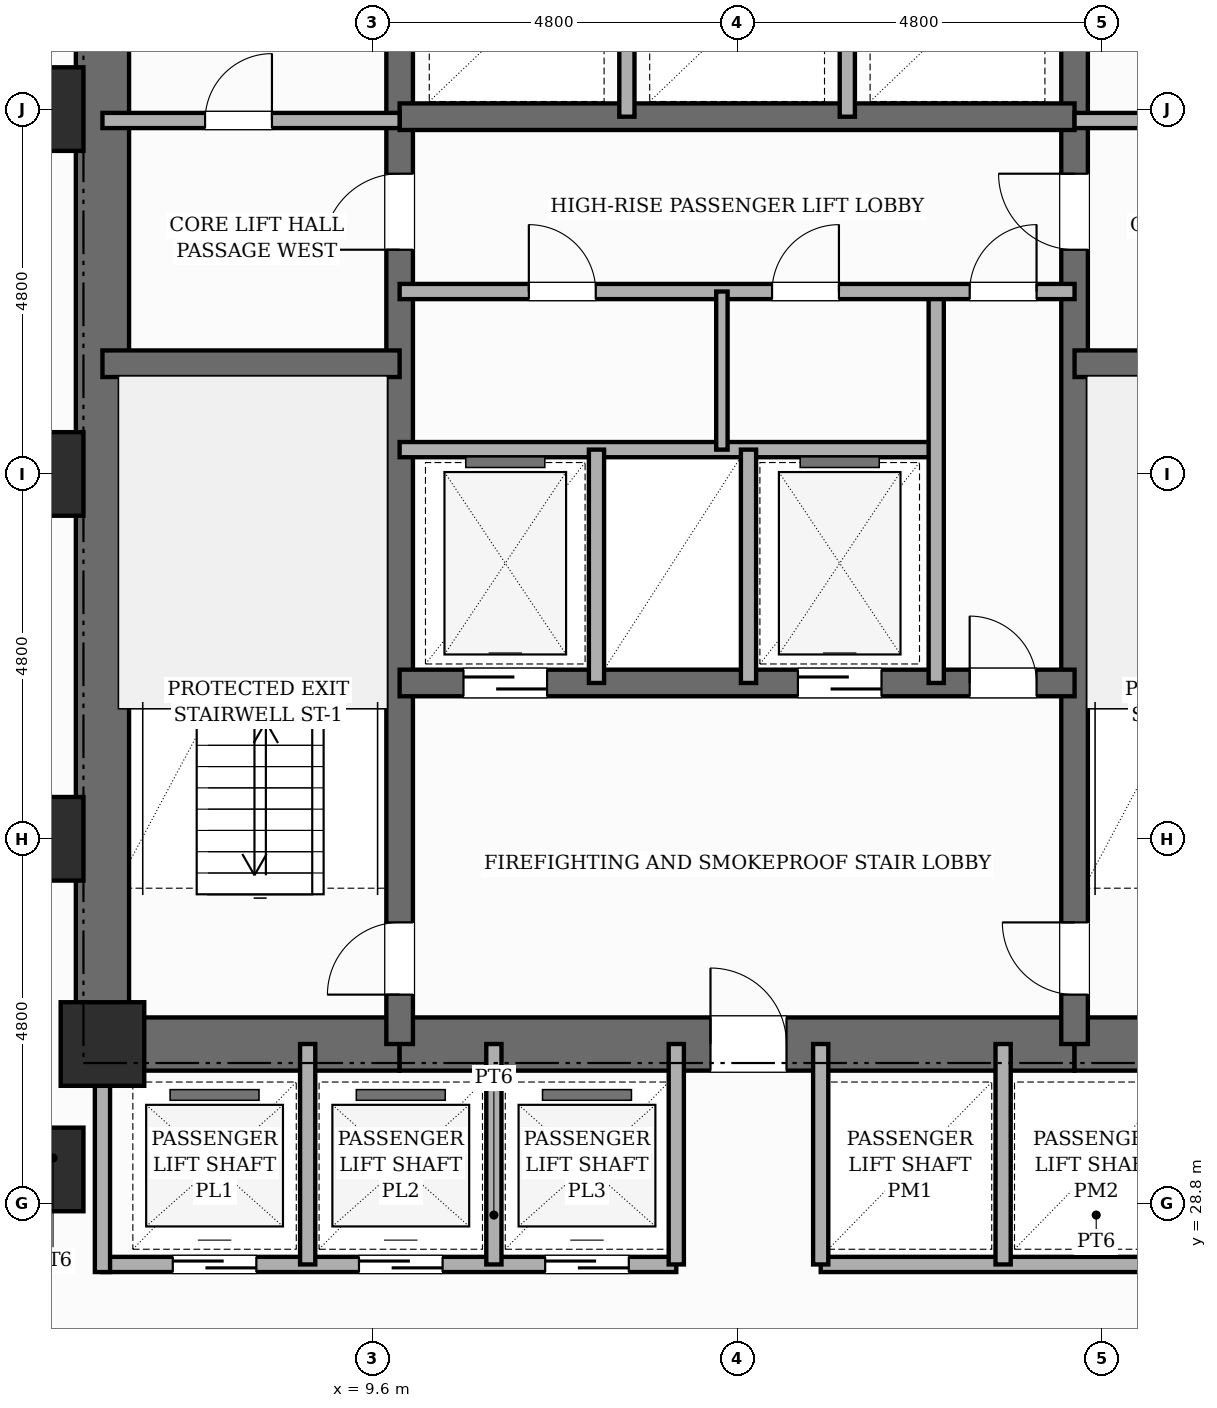
"""IFC4 building model, lengths in metres.
Left out: names, types, materials, properties, quantities, classifications, styles, units other than length and angle.
Written with IfcOpenShell. Run it as: python <this file> out.ifc"""

import sys

from ifc_helpers import new_model, si_unit, direction, frame, frame_2d, origin, origin_2d, place, context, subcontext, project, spatial, rectangle, extrude, element, fill, save


model = new_model("IFC4")
c1 = context("Model", 3, precision=1e-05, world=origin(), true_north=direction((0.0, 1.0)))
c2 = subcontext(c1, "Body", "Model", "MODEL_VIEW")
j1 = project(units=[si_unit("LENGTHUNIT", "METRE"), si_unit("PLANEANGLEUNIT", "RADIAN")], contexts=[c1])
p1 = place(None, origin())
s1 = spatial("IfcSite", under=j1, at=p1, CompositionType="ELEMENT")
p2 = place(p1, origin())
s2 = spatial("IfcBuilding", under=s1, at=p2, CompositionType="ELEMENT")
p3 = place(p2, frame((0.0, 0.0, 68.2)))
s3 = spatial("IfcBuildingStorey", under=s2, at=p3, CompositionType="ELEMENT", Elevation=68.2)
p4 = place(p3, frame((6.05, 30.55, 0.0), z_axis=(0.0, 0.0, 1.0), x_axis=(0.0, 1.0, 0.0)))
e1 = element("IfcWall", 1, at=p4, inside=s3, PredefinedType="SHEAR", context=c2, shape_type="SweptSolid", body=[
    extrude(rectangle(XDim=15.6, YDim=0.7, at=frame_2d((7.8, 0.0))), origin(), (0.0, 0.0, 1.0), 3.6),
])
p5 = place(p3, frame((6.05, 30.9, 0.0), z_axis=(0.0, 0.0, 1.0), x_axis=(1.0, 0.0, 0.0)))
e2 = element("IfcWall", 2, at=p5, inside=s3, PredefinedType="SHEAR", context=c2, shape_type="SweptSolid", body=[
    extrude(rectangle(XDim=3.91, YDim=0.7, at=frame_2d((1.955, 0.0))), origin(), (0.0, 0.0, 1.0), 3.6),
])
p6 = place(p3, frame((9.96, 30.9, 0.0), z_axis=(0.0, 0.0, 1.0), x_axis=(1.0, 0.0, 0.0)))
e3 = element("IfcWall", 3, at=p6, inside=s3, PredefinedType="SHEAR", context=c2, shape_type="SweptSolid", body=[
    extrude(rectangle(XDim=8.88, YDim=0.7, at=frame_2d((4.44, 0.0))), origin(), (0.0, 0.0, 1.0), 3.6),
])
p7 = place(p6, frame((4.09, 0.0, 0.0)))
e4 = element("IfcOpeningElement", 4, at=p7, cuts=e3, PredefinedType="OPENING", context=c2, shape_type="SweptSolid", body=[
    extrude(rectangle(XDim=1.0, YDim=2.15, at=frame_2d((0.5, 1.075))), frame((0.0, 0.36, 0.0), z_axis=(0.0, -1.0, 0.0), x_axis=(1.0, 0.0, 0.0)), (0.0, 0.0, 1.0), 0.72),
])
p8 = place(p3, frame((18.84, 30.9, 0.0), z_axis=(0.0, 0.0, 1.0), x_axis=(1.0, 0.0, 0.0)))
e5 = element("IfcWall", 5, at=p8, inside=s3, PredefinedType="SHEAR", context=c2, shape_type="SweptSolid", body=[
    extrude(rectangle(XDim=3.91, YDim=0.7, at=frame_2d((1.955, 0.0))), origin(), (0.0, 0.0, 1.0), 3.6),
])
p9 = place(p3, frame((9.96, 30.9, 0.0), z_axis=(0.0, 0.0, 1.0), x_axis=(0.0, 1.0, 0.0)))
e6 = element("IfcWall", 6, at=p9, inside=s3, PredefinedType="SHEAR", context=c2, shape_type="SweptSolid", body=[
    extrude(rectangle(XDim=14.9, YDim=0.35, at=frame_2d((7.45, 0.0))), origin(), (0.0, 0.0, 1.0), 3.6),
])
p10 = place(p9, frame((0.65, 0.0, 0.0)))
e7 = element("IfcOpeningElement", 7, at=p10, cuts=e6, PredefinedType="OPENING", context=c2, shape_type="SweptSolid", body=[
    extrude(rectangle(XDim=0.95, YDim=2.1, at=frame_2d((0.475, 1.05))), frame((0.0, 0.185, 0.0), z_axis=(0.0, -1.0, 0.0), x_axis=(1.0, 0.0, 0.0)), (0.0, 0.0, 1.0), 0.37),
])
p11 = place(p9, frame((10.45, 0.0, 0.0)))
e8 = element("IfcOpeningElement", 8, at=p11, cuts=e6, PredefinedType="OPENING", context=c2, shape_type="SweptSolid", body=[
    extrude(rectangle(XDim=1.0, YDim=2.15, at=frame_2d((0.5, 1.075))), frame((0.0, 0.185, 0.0), z_axis=(0.0, -1.0, 0.0), x_axis=(1.0, 0.0, 0.0)), (0.0, 0.0, 1.0), 0.37),
])
p12 = place(p3, frame((18.84, 30.9, 0.0), z_axis=(0.0, 0.0, 1.0), x_axis=(0.0, 1.0, 0.0)))
e9 = element("IfcWall", 9, at=p12, inside=s3, PredefinedType="SHEAR", context=c2, shape_type="SweptSolid", body=[
    extrude(rectangle(XDim=14.9, YDim=0.35, at=frame_2d((7.45, 0.0))), origin(), (0.0, 0.0, 1.0), 3.6),
])
p13 = place(p12, frame((0.65, 0.0, 0.0)))
e10 = element("IfcOpeningElement", 10, at=p13, cuts=e9, PredefinedType="OPENING", context=c2, shape_type="SweptSolid", body=[
    extrude(rectangle(XDim=0.95, YDim=2.1, at=frame_2d((0.475, 1.05))), frame((0.0, 0.185, 0.0), z_axis=(0.0, -1.0, 0.0), x_axis=(1.0, 0.0, 0.0)), (0.0, 0.0, 1.0), 0.37),
])
p14 = place(p12, frame((10.45, 0.0, 0.0)))
e11 = element("IfcOpeningElement", 11, at=p14, cuts=e9, PredefinedType="OPENING", context=c2, shape_type="SweptSolid", body=[
    extrude(rectangle(XDim=1.0, YDim=2.15, at=frame_2d((0.5, 1.075))), frame((0.0, 0.185, 0.0), z_axis=(0.0, -1.0, 0.0), x_axis=(1.0, 0.0, 0.0)), (0.0, 0.0, 1.0), 0.37),
])
for number, where, z_axis, x_axis in (
    (12, (6.05, 39.85, 0.0), (0.0, 0.0, 1.0), (1.0, 0.0, 0.0)),
    (13, (18.84, 39.85, 0.0), (0.0, 0.0, 1.0), (1.0, 0.0, 0.0)),
):
    element("IfcWall", number, at=place(p3, frame(where, z_axis=z_axis, x_axis=x_axis)), inside=s3, PredefinedType="SHEAR", context=c2, shape_type="SweptSolid", body=[
        extrude(rectangle(XDim=3.91, YDim=0.35, at=frame_2d((1.955, 0.0))), origin(), (0.0, 0.0, 1.0), 3.6),
    ])
p15 = place(p3, frame((9.96, 35.65, 0.0), z_axis=(0.0, 0.0, 1.0), x_axis=(1.0, 0.0, 0.0)))
e14 = element("IfcWall", 14, at=p15, inside=s3, PredefinedType="SHEAR", context=c2, shape_type="SweptSolid", body=[
    extrude(rectangle(XDim=8.88, YDim=0.35, at=frame_2d((4.44, 0.0))), origin(), (0.0, 0.0, 1.0), 3.6),
])
p16 = place(p15, frame((0.84, 0.0, 0.0)))
e15 = element("IfcOpeningElement", 15, at=p16, cuts=e14, PredefinedType="OPENING", context=c2, shape_type="SweptSolid", body=[
    extrude(rectangle(XDim=1.1, YDim=2.15, at=frame_2d((0.55, 1.075))), frame((0.0, 0.185, 0.0), z_axis=(0.0, -1.0, 0.0), x_axis=(1.0, 0.0, 0.0)), (0.0, 0.0, 1.0), 0.37),
])
p17 = place(p15, frame((5.24, 0.0, 0.0)))
e16 = element("IfcOpeningElement", 16, at=p17, cuts=e14, PredefinedType="OPENING", context=c2, shape_type="SweptSolid", body=[
    extrude(rectangle(XDim=1.1, YDim=2.15, at=frame_2d((0.55, 1.075))), frame((0.0, 0.185, 0.0), z_axis=(0.0, -1.0, 0.0), x_axis=(1.0, 0.0, 0.0)), (0.0, 0.0, 1.0), 0.37),
])
p18 = place(p15, frame((7.5, 0.0, 0.0)))
e17 = element("IfcOpeningElement", 17, at=p18, cuts=e14, PredefinedType="OPENING", context=c2, shape_type="SweptSolid", body=[
    extrude(rectangle(XDim=0.88, YDim=2.1, at=frame_2d((0.44, 1.05))), frame((0.0, 0.185, 0.0), z_axis=(0.0, -1.0, 0.0), x_axis=(1.0, 0.0, 0.0)), (0.0, 0.0, 1.0), 0.37),
])
p19 = place(p3, frame((9.96, 43.1, 0.0), z_axis=(0.0, 0.0, 1.0), x_axis=(1.0, 0.0, 0.0)))
e18 = element("IfcWall", 18, at=p19, inside=s3, PredefinedType="SHEAR", context=c2, shape_type="SweptSolid", body=[
    extrude(rectangle(XDim=8.88, YDim=0.35, at=frame_2d((4.44, 0.0))), origin(), (0.0, 0.0, 1.0), 3.6),
])
for number, where, z_axis, x_axis in (
    (19, (5.25, 29.25, 0.0), (0.0, 0.0, 1.0), (1.0, 0.0, 0.0)),
    (20, (5.25, 33.6, 0.0), (0.0, 0.0, 1.0), (1.0, 0.0, 0.0)),
    (21, (5.25, 38.4, 0.0), (0.0, 0.0, 1.0), (1.0, 0.0, 0.0)),
    (22, (5.25, 43.2, 0.0), (0.0, 0.0, 1.0), (1.0, 0.0, 0.0)),
    (23, (6.05, 30.9, 0.0), (0.0, 0.0, 1.0), (1.0, 0.0, 0.0)),
):
    element("IfcColumn", number, at=place(p3, frame(where, z_axis=z_axis, x_axis=x_axis)), inside=s3, PredefinedType="COLUMN", context=c2, shape_type="SweptSolid", body=[
        extrude(rectangle(XDim=1.1, YDim=1.1, at=origin_2d()), origin(), (0.0, 0.0, 1.0), 3.6),
    ])
p20 = place(p3, frame((9.96, 38.72, 0.0), z_axis=(0.0, 0.0, 1.0), x_axis=(1.0, 0.0, 0.0)))
e24 = element("IfcWall", 24, at=p20, inside=s3, PredefinedType="POLYGONAL", context=c2, shape_type="SweptSolid", body=[
    extrude(rectangle(XDim=7.06, YDim=0.2, at=frame_2d((3.53, 0.0))), origin(), (0.0, 0.0, 1.0), 3.35),
])
for number, where, z_axis, x_axis in (
    (25, (12.55, 35.65, 0.0), (0.0, 0.0, 1.0), (0.0, 1.0, 0.0)),
    (26, (14.55, 35.65, 0.0), (0.0, 0.0, 1.0), (0.0, 1.0, 0.0)),
):
    element("IfcWall", number, at=place(p3, frame(where, z_axis=z_axis, x_axis=x_axis)), inside=s3, PredefinedType="POLYGONAL", context=c2, shape_type="SweptSolid", body=[
        extrude(rectangle(XDim=3.07, YDim=0.2, at=frame_2d((1.535, 0.0))), origin(), (0.0, 0.0, 1.0), 3.35),
    ])
p21 = place(p3, frame((17.02, 35.65, 0.0), z_axis=(0.0, 0.0, 1.0), x_axis=(0.0, 1.0, 0.0)))
e27 = element("IfcWall", 27, at=p21, inside=s3, PredefinedType="POLYGONAL", context=c2, shape_type="SweptSolid", body=[
    extrude(rectangle(XDim=5.15, YDim=0.2, at=frame_2d((2.575, 0.0))), origin(), (0.0, 0.0, 1.0), 3.35),
])
p22 = place(p3, frame((9.96, 40.8, 0.0), z_axis=(0.0, 0.0, 1.0), x_axis=(1.0, 0.0, 0.0)))
e28 = element("IfcWall", 28, at=p22, inside=s3, PredefinedType="POLYGONAL", context=c2, shape_type="SweptSolid", body=[
    extrude(rectangle(XDim=8.88, YDim=0.2, at=frame_2d((4.44, 0.0))), origin(), (0.0, 0.0, 1.0), 3.35),
])
p23 = place(p22, frame((7.5, 0.0, 0.0)))
e29 = element("IfcOpeningElement", 29, at=p23, cuts=e28, PredefinedType="OPENING", context=c2, shape_type="SweptSolid", body=[
    extrude(rectangle(XDim=0.88, YDim=2.1, at=frame_2d((0.44, 1.05))), frame((0.0, 0.11, 0.0), z_axis=(0.0, -1.0, 0.0), x_axis=(1.0, 0.0, 0.0)), (0.0, 0.0, 1.0), 0.22),
])
p24 = place(p22, frame((1.7, 0.0, 0.0)))
e30 = element("IfcOpeningElement", 30, at=p24, cuts=e28, PredefinedType="OPENING", context=c2, shape_type="SweptSolid", body=[
    extrude(rectangle(XDim=0.88, YDim=2.1, at=frame_2d((0.44, 1.05))), frame((0.0, 0.11, 0.0), z_axis=(0.0, -1.0, 0.0), x_axis=(1.0, 0.0, 0.0)), (0.0, 0.0, 1.0), 0.22),
])
p25 = place(p22, frame((4.9, 0.0, 0.0)))
e31 = element("IfcOpeningElement", 31, at=p25, cuts=e28, PredefinedType="OPENING", context=c2, shape_type="SweptSolid", body=[
    extrude(rectangle(XDim=0.88, YDim=2.1, at=frame_2d((0.44, 1.05))), frame((0.0, 0.11, 0.0), z_axis=(0.0, -1.0, 0.0), x_axis=(1.0, 0.0, 0.0)), (0.0, 0.0, 1.0), 0.22),
])
p26 = place(p3, frame((18.84, 43.05, 0.0), z_axis=(0.0, 0.0, 1.0), x_axis=(1.0, 0.0, 0.0)))
e32 = element("IfcWall", 32, at=p26, inside=s3, PredefinedType="POLYGONAL", context=c2, shape_type="SweptSolid", body=[
    extrude(rectangle(XDim=3.91, YDim=0.2, at=frame_2d((1.955, 0.0))), origin(), (0.0, 0.0, 1.0), 2.53),
])
p27 = place(p26, frame((1.35, 0.0, 0.0)))
e33 = element("IfcOpeningElement", 33, at=p27, cuts=e32, PredefinedType="OPENING", context=c2, shape_type="SweptSolid", body=[
    extrude(rectangle(XDim=0.88, YDim=2.1, at=frame_2d((0.44, 1.05))), frame((0.0, 0.11, 0.0), z_axis=(0.0, -1.0, 0.0), x_axis=(1.0, 0.0, 0.0)), (0.0, 0.0, 1.0), 0.22),
])
p28 = place(p3, frame((6.05, 43.05, 0.0), z_axis=(0.0, 0.0, 1.0), x_axis=(1.0, 0.0, 0.0)))
e34 = element("IfcWall", 34, at=p28, inside=s3, PredefinedType="POLYGONAL", context=c2, shape_type="SweptSolid", body=[
    extrude(rectangle(XDim=3.91, YDim=0.2, at=frame_2d((1.955, 0.0))), origin(), (0.0, 0.0, 1.0), 2.53),
])
p29 = place(p28, frame((1.35, 0.0, 0.0)))
e35 = element("IfcOpeningElement", 35, at=p29, cuts=e34, PredefinedType="OPENING", context=c2, shape_type="SweptSolid", body=[
    extrude(rectangle(XDim=0.88, YDim=2.1, at=frame_2d((0.44, 1.05))), frame((0.0, 0.11, 0.0), z_axis=(0.0, -1.0, 0.0), x_axis=(1.0, 0.0, 0.0)), (0.0, 0.0, 1.0), 0.22),
])
for number, where, z_axis, x_axis in (
    (36, (12.95, 43.1, 0.0), (0.0, 0.0, 1.0), (0.0, 1.0, 0.0)),
    (37, (15.85, 43.1, 0.0), (0.0, 0.0, 1.0), (0.0, 1.0, 0.0)),
):
    element("IfcWall", number, at=place(p3, frame(where, z_axis=z_axis, x_axis=x_axis)), inside=s3, PredefinedType="POLYGONAL", context=c2, shape_type="SweptSolid", body=[
        extrude(rectangle(XDim=2.55, YDim=0.2, at=frame_2d((1.275, 0.0))), origin(), (0.0, 0.0, 1.0), 3.35),
    ])
p30 = place(p3, frame((14.2, 38.72, 0.0), z_axis=(0.0, 0.0, 1.0), x_axis=(0.0, 1.0, 0.0)))
e38 = element("IfcWall", 38, at=p30, inside=s3, PredefinedType="PARTITIONING", context=c2, shape_type="SweptSolid", body=[
    extrude(rectangle(XDim=2.08, YDim=0.15, at=frame_2d((1.04, 0.0))), origin(), (0.0, 0.0, 1.0), 3.35),
])
p31 = place(p3, frame((6.05, 28.0, 0.0), z_axis=(0.0, 0.0, 1.0), x_axis=(1.0, 0.0, 0.0)))
e39 = element("IfcWall", 39, at=p31, inside=s3, PredefinedType="POLYGONAL", context=c2, shape_type="SweptSolid", body=[
    extrude(rectangle(XDim=7.55, YDim=0.2, at=frame_2d((3.775, 0.0))), origin(), (0.0, 0.0, 1.0), 3.35),
])
p32 = place(p31, frame((0.925, 0.0, 0.0)))
e40 = element("IfcOpeningElement", 40, at=p32, cuts=e39, PredefinedType="OPENING", context=c2, shape_type="SweptSolid", body=[
    extrude(rectangle(XDim=1.1, YDim=2.15, at=frame_2d((0.55, 1.075))), frame((0.0, 0.11, 0.0), z_axis=(0.0, -1.0, 0.0), x_axis=(1.0, 0.0, 0.0)), (0.0, 0.0, 1.0), 0.22),
])
p33 = place(p31, frame((3.375, 0.0, 0.0)))
e41 = element("IfcOpeningElement", 41, at=p33, cuts=e39, PredefinedType="OPENING", context=c2, shape_type="SweptSolid", body=[
    extrude(rectangle(XDim=1.1, YDim=2.15, at=frame_2d((0.55, 1.075))), frame((0.0, 0.11, 0.0), z_axis=(0.0, -1.0, 0.0), x_axis=(1.0, 0.0, 0.0)), (0.0, 0.0, 1.0), 0.22),
])
p34 = place(p31, frame((5.825, 0.0, 0.0)))
e42 = element("IfcOpeningElement", 42, at=p34, cuts=e39, PredefinedType="OPENING", context=c2, shape_type="SweptSolid", body=[
    extrude(rectangle(XDim=1.1, YDim=2.15, at=frame_2d((0.55, 1.075))), frame((0.0, 0.11, 0.0), z_axis=(0.0, -1.0, 0.0), x_axis=(1.0, 0.0, 0.0)), (0.0, 0.0, 1.0), 0.22),
])
p35 = place(p3, frame((15.5, 28.0, 0.0), z_axis=(0.0, 0.0, 1.0), x_axis=(1.0, 0.0, 0.0)))
e43 = element("IfcWall", 43, at=p35, inside=s3, PredefinedType="POLYGONAL", context=c2, shape_type="SweptSolid", body=[
    extrude(rectangle(XDim=7.25, YDim=0.2, at=frame_2d((3.625, 0.0))), origin(), (0.0, 0.0, 1.0), 3.35),
])
p36 = place(p3, frame((6.05, 27.9, 0.0), z_axis=(0.0, 0.0, 1.0), x_axis=(0.0, 1.0, 0.0)))
e44 = element("IfcWall", 44, at=p36, inside=s3, PredefinedType="POLYGONAL", context=c2, shape_type="SweptSolid", body=[
    extrude(rectangle(XDim=3.0, YDim=0.2, at=frame_2d((1.5, 0.0))), origin(), (0.0, 0.0, 1.0), 3.35),
])
for number, where, z_axis, x_axis in (
    (45, (13.6, 28.0, 0.0), (0.0, 0.0, 1.0), (0.0, 1.0, 0.0)),
    (46, (15.5, 28.0, 0.0), (0.0, 0.0, 1.0), (0.0, 1.0, 0.0)),
    (47, (8.75, 28.0, 0.0), (0.0, 0.0, 1.0), (0.0, 1.0, 0.0)),
    (48, (11.2, 28.0, 0.0), (0.0, 0.0, 1.0), (0.0, 1.0, 0.0)),
    (49, (17.9, 28.0, 0.0), (0.0, 0.0, 1.0), (0.0, 1.0, 0.0)),
):
    element("IfcWall", number, at=place(p3, frame(where, z_axis=z_axis, x_axis=x_axis)), inside=s3, PredefinedType="POLYGONAL", context=c2, shape_type="SweptSolid", body=[
        extrude(rectangle(XDim=2.9, YDim=0.2, at=frame_2d((1.45, 0.0))), origin(), (0.0, 0.0, 1.0), 3.35),
    ])
p37 = place(p10, origin())
e50 = element("IfcDoor", 50, at=p37, inside=s3, OperationType="SINGLE_SWING_LEFT", PredefinedType="DOOR", context=c2, shape_type="SweptSolid", body=[
    extrude(rectangle(XDim=0.95, YDim=2.1, at=frame_2d((0.475, 1.05))), frame((0.0, 0.025, 0.0), z_axis=(0.0, -1.0, 0.0), x_axis=(1.0, 0.0, 0.0)), (0.0, 0.0, 1.0), 0.05),
])
fill(e7, e50)
p38 = place(p13, origin())
e51 = element("IfcDoor", 51, at=p38, inside=s3, OperationType="SINGLE_SWING_RIGHT", PredefinedType="DOOR", context=c2, shape_type="SweptSolid", body=[
    extrude(rectangle(XDim=0.95, YDim=2.1, at=frame_2d((0.475, 1.05))), frame((0.0, 0.025, 0.0), z_axis=(0.0, -1.0, 0.0), x_axis=(1.0, 0.0, 0.0)), (0.0, 0.0, 1.0), 0.05),
])
fill(e10, e51)
p39 = place(p7, origin())
e52 = element("IfcDoor", 52, at=p39, inside=s3, OperationType="SINGLE_SWING_LEFT", PredefinedType="DOOR", context=c2, shape_type="SweptSolid", body=[
    extrude(rectangle(XDim=1.0, YDim=2.15, at=frame_2d((0.5, 1.075))), frame((0.0, 0.025, 0.0), z_axis=(0.0, -1.0, 0.0), x_axis=(1.0, 0.0, 0.0)), (0.0, 0.0, 1.0), 0.05),
])
fill(e4, e52)
p40 = place(p16, origin())
e53 = element("IfcDoor", 53, at=p40, inside=s3, OperationType="SLIDING_TO_LEFT", PredefinedType="DOOR", context=c2, shape_type="SweptSolid", body=[
    extrude(rectangle(XDim=1.1, YDim=2.15, at=frame_2d((0.55, 1.075))), frame((0.0, 0.025, 0.0), z_axis=(0.0, -1.0, 0.0), x_axis=(1.0, 0.0, 0.0)), (0.0, 0.0, 1.0), 0.05),
])
fill(e15, e53)
p41 = place(p17, origin())
e54 = element("IfcDoor", 54, at=p41, inside=s3, OperationType="SLIDING_TO_RIGHT", PredefinedType="DOOR", context=c2, shape_type="SweptSolid", body=[
    extrude(rectangle(XDim=1.1, YDim=2.15, at=frame_2d((0.55, 1.075))), frame((0.0, 0.025, 0.0), z_axis=(0.0, -1.0, 0.0), x_axis=(1.0, 0.0, 0.0)), (0.0, 0.0, 1.0), 0.05),
])
fill(e16, e54)
p42 = place(p18, origin())
e55 = element("IfcDoor", 55, at=p42, inside=s3, OperationType="SINGLE_SWING_LEFT", PredefinedType="DOOR", context=c2, shape_type="SweptSolid", body=[
    extrude(rectangle(XDim=0.88, YDim=2.1, at=frame_2d((0.44, 1.05))), frame((0.0, 0.025, 0.0), z_axis=(0.0, -1.0, 0.0), x_axis=(1.0, 0.0, 0.0)), (0.0, 0.0, 1.0), 0.05),
])
fill(e17, e55)
p43 = place(p23, origin())
e56 = element("IfcDoor", 56, at=p43, inside=s3, OperationType="SINGLE_SWING_RIGHT", PredefinedType="DOOR", context=c2, shape_type="SweptSolid", body=[
    extrude(rectangle(XDim=0.88, YDim=2.1, at=frame_2d((0.44, 1.05))), frame((0.0, 0.025, 0.0), z_axis=(0.0, -1.0, 0.0), x_axis=(1.0, 0.0, 0.0)), (0.0, 0.0, 1.0), 0.05),
])
fill(e29, e56)
p44 = place(p11, origin())
e57 = element("IfcDoor", 57, at=p44, inside=s3, OperationType="SINGLE_SWING_LEFT", PredefinedType="DOOR", context=c2, shape_type="SweptSolid", body=[
    extrude(rectangle(XDim=1.0, YDim=2.15, at=frame_2d((0.5, 1.075))), frame((0.0, 0.025, 0.0), z_axis=(0.0, -1.0, 0.0), x_axis=(1.0, 0.0, 0.0)), (0.0, 0.0, 1.0), 0.05),
])
fill(e8, e57)
p45 = place(p14, origin())
e58 = element("IfcDoor", 58, at=p45, inside=s3, OperationType="SINGLE_SWING_RIGHT", PredefinedType="DOOR", context=c2, shape_type="SweptSolid", body=[
    extrude(rectangle(XDim=1.0, YDim=2.15, at=frame_2d((0.5, 1.075))), frame((0.0, 0.025, 0.0), z_axis=(0.0, -1.0, 0.0), x_axis=(1.0, 0.0, 0.0)), (0.0, 0.0, 1.0), 0.05),
])
fill(e11, e58)
p46 = place(p29, origin())
e59 = element("IfcDoor", 59, at=p46, inside=s3, OperationType="SINGLE_SWING_RIGHT", PredefinedType="DOOR", context=c2, shape_type="SweptSolid", body=[
    extrude(rectangle(XDim=0.88, YDim=2.1, at=frame_2d((0.44, 1.05))), frame((0.0, 0.025, 0.0), z_axis=(0.0, -1.0, 0.0), x_axis=(1.0, 0.0, 0.0)), (0.0, 0.0, 1.0), 0.05),
])
fill(e35, e59)
p47 = place(p24, origin())
e60 = element("IfcDoor", 60, at=p47, inside=s3, OperationType="SINGLE_SWING_LEFT", PredefinedType="DOOR", context=c2, shape_type="SweptSolid", body=[
    extrude(rectangle(XDim=0.88, YDim=2.1, at=frame_2d((0.44, 1.05))), frame((0.0, 0.025, 0.0), z_axis=(0.0, -1.0, 0.0), x_axis=(1.0, 0.0, 0.0)), (0.0, 0.0, 1.0), 0.05),
])
fill(e30, e60)
p48 = place(p25, origin())
e61 = element("IfcDoor", 61, at=p48, inside=s3, OperationType="SINGLE_SWING_RIGHT", PredefinedType="DOOR", context=c2, shape_type="SweptSolid", body=[
    extrude(rectangle(XDim=0.88, YDim=2.1, at=frame_2d((0.44, 1.05))), frame((0.0, 0.025, 0.0), z_axis=(0.0, -1.0, 0.0), x_axis=(1.0, 0.0, 0.0)), (0.0, 0.0, 1.0), 0.05),
])
fill(e31, e61)
p49 = place(p32, origin())
e62 = element("IfcDoor", 62, at=p49, inside=s3, OperationType="SLIDING_TO_LEFT", PredefinedType="DOOR", context=c2, shape_type="SweptSolid", body=[
    extrude(rectangle(XDim=1.1, YDim=2.15, at=frame_2d((0.55, 1.075))), frame((0.0, 0.025, 0.0), z_axis=(0.0, -1.0, 0.0), x_axis=(1.0, 0.0, 0.0)), (0.0, 0.0, 1.0), 0.05),
])
fill(e40, e62)
p50 = place(p33, origin())
e63 = element("IfcDoor", 63, at=p50, inside=s3, OperationType="SLIDING_TO_RIGHT", PredefinedType="DOOR", context=c2, shape_type="SweptSolid", body=[
    extrude(rectangle(XDim=1.1, YDim=2.15, at=frame_2d((0.55, 1.075))), frame((0.0, 0.025, 0.0), z_axis=(0.0, -1.0, 0.0), x_axis=(1.0, 0.0, 0.0)), (0.0, 0.0, 1.0), 0.05),
])
fill(e41, e63)
p51 = place(p34, origin())
e64 = element("IfcDoor", 64, at=p51, inside=s3, OperationType="SLIDING_TO_LEFT", PredefinedType="DOOR", context=c2, shape_type="SweptSolid", body=[
    extrude(rectangle(XDim=1.1, YDim=2.15, at=frame_2d((0.55, 1.075))), frame((0.0, 0.025, 0.0), z_axis=(0.0, -1.0, 0.0), x_axis=(1.0, 0.0, 0.0)), (0.0, 0.0, 1.0), 0.05),
])
fill(e42, e64)
save(model, sys.argv[1])
